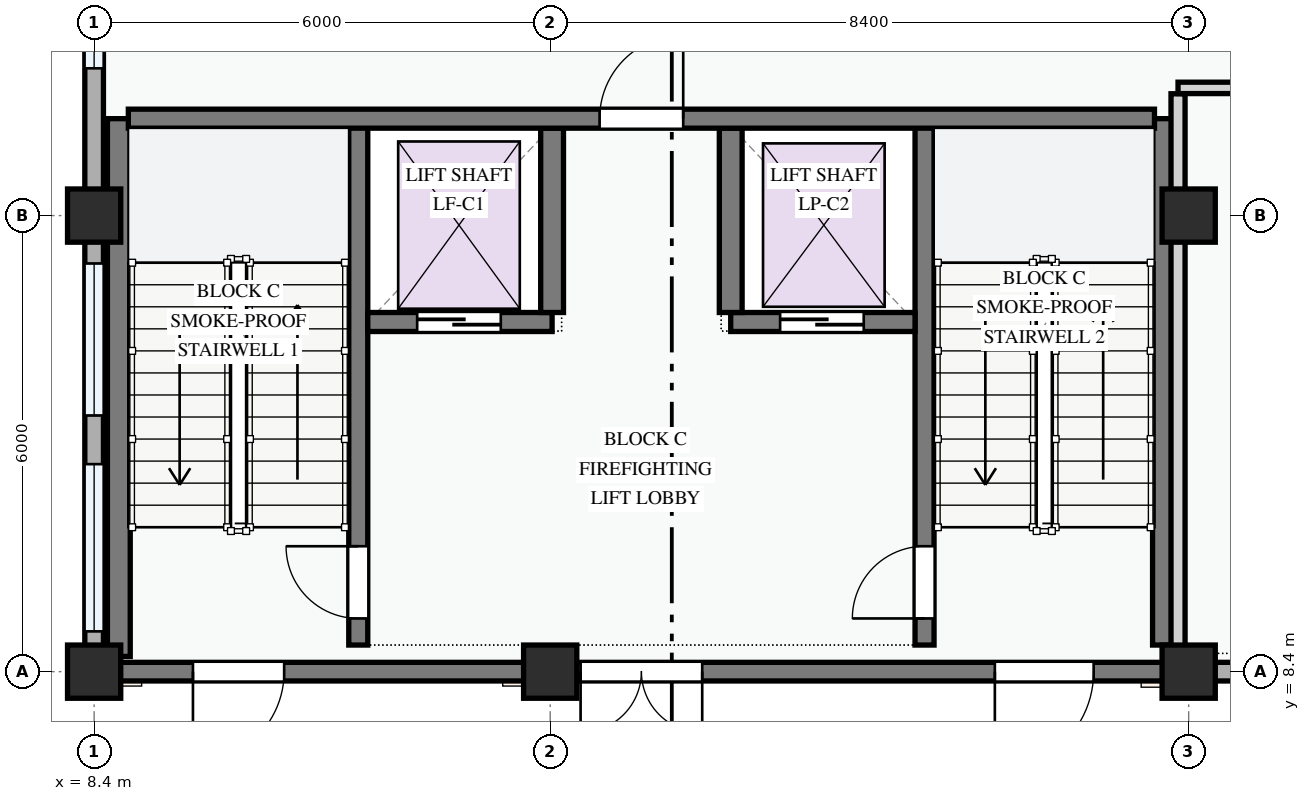
"""IFC4 building model, lengths in metres.
Left out: names, types, materials, properties, quantities, classifications, styles, units other than length and angle.
Written with IfcOpenShell. Run it as: python <this file> out.ifc"""

import sys

from ifc_helpers import new_model, si_unit, direction, frame, frame_2d, origin, origin_2d, place, context, subcontext, project, spatial, rectangle, extrude, element, fill, save


model = new_model("IFC4")
c1 = context("Model", 3, precision=1e-05, world=origin(), true_north=direction((0.0, 1.0)))
c2 = subcontext(c1, "Body", "Model", "MODEL_VIEW")
j1 = project(units=[si_unit("LENGTHUNIT", "METRE"), si_unit("PLANEANGLEUNIT", "RADIAN")], contexts=[c1])
p1 = place(None, origin())
s1 = spatial("IfcSite", under=j1, at=p1, CompositionType="ELEMENT")
p2 = place(p1, origin())
s2 = spatial("IfcBuilding", under=s1, at=p2, CompositionType="ELEMENT")
p3 = place(p2, origin())
s3 = spatial("IfcBuildingStorey", under=s2, at=p3, CompositionType="ELEMENT", Elevation=0.0)
for number, where, z_axis, x_axis in (
    (1, (8.4, 8.4, 0.0), (0.0, 0.0, 1.0), (1.0, 0.0, 0.0)),
    (2, (8.4, 14.4, 0.0), (0.0, 0.0, 1.0), (1.0, 0.0, 0.0)),
    (3, (14.4, 8.4, 0.0), (0.0, 0.0, 1.0), (1.0, 0.0, 0.0)),
    (4, (22.8, 8.4, 0.0), (0.0, 0.0, 1.0), (1.0, 0.0, 0.0)),
    (5, (22.8, 14.4, 0.0), (0.0, 0.0, 1.0), (1.0, 0.0, 0.0)),
):
    element("IfcColumn", number, at=place(p3, frame(where, z_axis=z_axis, x_axis=x_axis)), inside=s3, PredefinedType="COLUMN", context=c2, shape_type="SweptSolid", body=[
        extrude(rectangle(XDim=0.7, YDim=0.7, at=origin_2d()), origin(), (0.0, 0.0, 1.0), 4.5),
    ])
p4 = place(p3, frame((8.4, 22.8, 0.0), z_axis=(0.0, 0.0, 1.0), x_axis=(0.0, -1.0, 0.0)))
e6 = element("IfcWall", 6, at=p4, inside=s3, PredefinedType="STANDARD", context=c2, shape_type="SweptSolid", body=[
    extrude(rectangle(XDim=8.4, YDim=0.245, at=frame_2d((4.2, 0.0))), origin(), (0.0, 0.0, 1.0), 3.485),
])
p5 = place(p4, frame((1.055, 0.0, 0.78)))
e7 = element("IfcOpeningElement", 7, at=p5, cuts=e6, PredefinedType="OPENING", context=c2, shape_type="SweptSolid", body=[
    extrude(rectangle(XDim=2.28, YDim=1.46, at=frame_2d((1.14, 0.73))), frame((0.0, 0.133, 0.0), z_axis=(0.0, -1.0, 0.0), x_axis=(1.0, 0.0, 0.0)), (0.0, 0.0, 1.0), 0.265),
])
p6 = place(p4, frame((4.863, 0.0, 0.78)))
e8 = element("IfcOpeningElement", 8, at=p6, cuts=e6, PredefinedType="OPENING", context=c2, shape_type="SweptSolid", body=[
    extrude(rectangle(XDim=1.6, YDim=1.55, at=frame_2d((0.8, 0.775))), frame((0.0, 0.133, 0.0), z_axis=(0.0, -1.0, 0.0), x_axis=(1.0, 0.0, 0.0)), (0.0, 0.0, 1.0), 0.265),
])
p7 = place(p3, frame((8.4, 14.4, 0.0), z_axis=(0.0, 0.0, 1.0), x_axis=(0.0, -1.0, 0.0)))
e9 = element("IfcWall", 9, at=p7, inside=s3, PredefinedType="STANDARD", context=c2, shape_type="SweptSolid", body=[
    extrude(rectangle(XDim=6.0, YDim=0.245, at=frame_2d((3.0, 0.0))), origin(), (0.0, 0.0, 1.0), 3.585),
])
p8 = place(p7, frame((0.63, 0.0, 0.78)))
e10 = element("IfcOpeningElement", 10, at=p8, cuts=e9, PredefinedType="OPENING", context=c2, shape_type="SweptSolid", body=[
    extrude(rectangle(XDim=2.0, YDim=1.5, at=frame_2d((1.0, 0.75))), frame((0.0, 0.133, 0.0), z_axis=(0.0, -1.0, 0.0), x_axis=(1.0, 0.0, 0.0)), (0.0, 0.0, 1.0), 0.265),
])
p9 = place(p7, frame((3.27, 0.0, 0.78)))
e11 = element("IfcOpeningElement", 11, at=p9, cuts=e9, PredefinedType="OPENING", context=c2, shape_type="SweptSolid", body=[
    extrude(rectangle(XDim=2.2, YDim=1.75, at=frame_2d((1.1, 0.875))), frame((0.0, 0.133, 0.0), z_axis=(0.0, -1.0, 0.0), x_axis=(1.0, 0.0, 0.0)), (0.0, 0.0, 1.0), 0.265),
])
p10 = place(p3, frame((8.4, 8.4, 0.0), z_axis=(0.0, 0.0, 1.0), x_axis=(1.0, 0.0, 0.0)))
e12 = element("IfcWall", 12, at=p10, inside=s3, PredefinedType="STANDARD", context=c2, shape_type="SweptSolid", body=[
    extrude(rectangle(XDim=6.0, YDim=0.245, at=frame_2d((3.0, 0.0))), origin(), (0.0, 0.0, 1.0), 4.2),
])
p11 = place(p10, frame((1.3, 0.0, 0.0)))
e13 = element("IfcOpeningElement", 13, at=p11, cuts=e12, PredefinedType="OPENING", context=c2, shape_type="SweptSolid", body=[
    extrude(rectangle(XDim=1.2, YDim=2.2, at=frame_2d((0.6, 1.1))), frame((0.0, 0.133, 0.0), z_axis=(0.0, -1.0, 0.0), x_axis=(1.0, 0.0, 0.0)), (0.0, 0.0, 1.0), 0.265),
])
p12 = place(p3, frame((14.4, 8.4, 0.0), z_axis=(0.0, 0.0, 1.0), x_axis=(1.0, 0.0, 0.0)))
e14 = element("IfcWall", 14, at=p12, inside=s3, PredefinedType="STANDARD", context=c2, shape_type="SweptSolid", body=[
    extrude(rectangle(XDim=8.4, YDim=0.245, at=frame_2d((4.2, 0.0))), origin(), (0.0, 0.0, 1.0), 4.2),
])
p13 = place(p12, frame((0.4, 0.0, 0.0)))
e15 = element("IfcOpeningElement", 15, at=p13, cuts=e14, PredefinedType="OPENING", context=c2, shape_type="SweptSolid", body=[
    extrude(rectangle(XDim=1.6, YDim=2.35, at=frame_2d((0.8, 1.175))), frame((0.0, 0.133, 0.0), z_axis=(0.0, -1.0, 0.0), x_axis=(1.0, 0.0, 0.0)), (0.0, 0.0, 1.0), 0.265),
])
p14 = place(p12, frame((5.85, 0.0, 0.0)))
e16 = element("IfcOpeningElement", 16, at=p14, cuts=e14, PredefinedType="OPENING", context=c2, shape_type="SweptSolid", body=[
    extrude(rectangle(XDim=1.3, YDim=2.2, at=frame_2d((0.65, 1.1))), frame((0.0, 0.133, 0.0), z_axis=(0.0, -1.0, 0.0), x_axis=(1.0, 0.0, 0.0)), (0.0, 0.0, 1.0), 0.265),
])
p15 = place(p3, frame((22.8, 8.4, 0.0), z_axis=(0.0, 0.0, 1.0), x_axis=(1.0, 0.0, 0.0)))
e17 = element("IfcWall", 17, at=p15, inside=s3, PredefinedType="STANDARD", context=c2, shape_type="SweptSolid", body=[
    extrude(rectangle(XDim=6.0, YDim=0.245, at=frame_2d((3.0, 0.0))), origin(), (0.0, 0.0, 1.0), 3.585),
])
p16 = place(p15, frame((0.58, 0.0, 0.78)))
e18 = element("IfcOpeningElement", 18, at=p16, cuts=e17, PredefinedType="OPENING", context=c2, shape_type="SweptSolid", body=[
    extrude(rectangle(XDim=2.1, YDim=1.55, at=frame_2d((1.05, 0.775))), frame((0.0, 0.133, 0.0), z_axis=(0.0, -1.0, 0.0), x_axis=(1.0, 0.0, 0.0)), (0.0, 0.0, 1.0), 0.265),
])
p17 = place(p15, frame((3.895, 0.0, 0.78)))
e19 = element("IfcOpeningElement", 19, at=p17, cuts=e17, PredefinedType="OPENING", context=c2, shape_type="SweptSolid", body=[
    extrude(rectangle(XDim=0.95, YDim=1.15, at=frame_2d((0.475, 0.575))), frame((0.0, 0.133, 0.0), z_axis=(0.0, -1.0, 0.0), x_axis=(1.0, 0.0, 0.0)), (0.0, 0.0, 1.0), 0.265),
])
p18 = place(p3, frame((11.875, 8.75, 0.0), z_axis=(0.0, 0.0, 1.0), x_axis=(0.0, 1.0, 0.0)))
e20 = element("IfcWall", 20, at=p18, inside=s3, PredefinedType="SHEAR", context=c2, shape_type="SweptSolid", body=[
    extrude(rectangle(XDim=6.925, YDim=0.25, at=frame_2d((3.462, 0.0))), origin(), (0.0, 0.0, 1.0), 4.2),
])
p19 = place(p18, frame((0.35, 0.0, 0.0)))
e21 = element("IfcOpeningElement", 21, at=p19, cuts=e20, PredefinedType="OPENING", context=c2, shape_type="SweptSolid", body=[
    extrude(rectangle(XDim=0.95, YDim=2.1, at=frame_2d((0.475, 1.05))), frame((0.0, 0.135, 0.0), z_axis=(0.0, -1.0, 0.0), x_axis=(1.0, 0.0, 0.0)), (0.0, 0.0, 1.0), 0.27),
])
p20 = place(p3, frame((8.725, 8.6, 0.0), z_axis=(0.0, 0.0, 1.0), x_axis=(0.0, 1.0, 0.0)))
e22 = element("IfcWall", 22, at=p20, inside=s3, PredefinedType="SHEAR", context=c2, shape_type="SweptSolid", body=[
    extrude(rectangle(XDim=7.075, YDim=0.3, at=frame_2d((3.538, 0.0))), origin(), (0.0, 0.0, 1.0), 4.2),
])
p21 = place(p3, frame((22.475, 8.75, 0.0), z_axis=(0.0, 0.0, 1.0), x_axis=(0.0, 1.0, 0.0)))
e23 = element("IfcWall", 23, at=p21, inside=s3, PredefinedType="SHEAR", context=c2, shape_type="SweptSolid", body=[
    extrude(rectangle(XDim=6.925, YDim=0.3, at=frame_2d((3.462, 0.0))), origin(), (0.0, 0.0, 1.0), 4.2),
])
p22 = place(p3, frame((19.325, 8.75, 0.0), z_axis=(0.0, 0.0, 1.0), x_axis=(0.0, 1.0, 0.0)))
e24 = element("IfcWall", 24, at=p22, inside=s3, PredefinedType="SHEAR", context=c2, shape_type="SweptSolid", body=[
    extrude(rectangle(XDim=6.925, YDim=0.25, at=frame_2d((3.462, 0.0))), origin(), (0.0, 0.0, 1.0), 4.2),
])
p23 = place(p22, frame((0.35, 0.0, 0.0)))
e25 = element("IfcOpeningElement", 25, at=p23, cuts=e24, PredefinedType="OPENING", context=c2, shape_type="SweptSolid", body=[
    extrude(rectangle(XDim=0.95, YDim=2.1, at=frame_2d((0.475, 1.05))), frame((0.0, 0.135, 0.0), z_axis=(0.0, -1.0, 0.0), x_axis=(1.0, 0.0, 0.0)), (0.0, 0.0, 1.0), 0.27),
])
p24 = place(p3, frame((12.0, 13.0, 0.0), z_axis=(0.0, 0.0, 1.0), x_axis=(1.0, 0.0, 0.0)))
e26 = element("IfcWall", 26, at=p24, inside=s3, PredefinedType="SHEAR", context=c2, shape_type="SweptSolid", body=[
    extrude(rectangle(XDim=2.425, YDim=0.25, at=frame_2d((1.212, 0.0))), origin(), (0.0, 0.0, 1.0), 4.2),
])
p25 = place(p24, frame((0.65, 0.0, 0.0)))
e27 = element("IfcOpeningElement", 27, at=p25, cuts=e26, PredefinedType="OPENING", context=c2, shape_type="SweptSolid", body=[
    extrude(rectangle(XDim=1.1, YDim=2.15, at=frame_2d((0.55, 1.075))), frame((0.0, 0.135, 0.0), z_axis=(0.0, -1.0, 0.0), x_axis=(1.0, 0.0, 0.0)), (0.0, 0.0, 1.0), 0.27),
])
p26 = place(p3, frame((16.775, 13.0, 0.0), z_axis=(0.0, 0.0, 1.0), x_axis=(1.0, 0.0, 0.0)))
e28 = element("IfcWall", 28, at=p26, inside=s3, PredefinedType="SHEAR", context=c2, shape_type="SweptSolid", body=[
    extrude(rectangle(XDim=2.425, YDim=0.25, at=frame_2d((1.212, 0.0))), origin(), (0.0, 0.0, 1.0), 4.2),
])
p27 = place(p26, frame((0.65, 0.0, 0.0)))
e29 = element("IfcOpeningElement", 29, at=p27, cuts=e28, PredefinedType="OPENING", context=c2, shape_type="SweptSolid", body=[
    extrude(rectangle(XDim=1.1, YDim=2.15, at=frame_2d((0.55, 1.075))), frame((0.0, 0.135, 0.0), z_axis=(0.0, -1.0, 0.0), x_axis=(1.0, 0.0, 0.0)), (0.0, 0.0, 1.0), 0.27),
])
for number, where, z_axis, x_axis in (
    (30, (14.425, 13.125, 0.0), (0.0, 0.0, 1.0), (0.0, 1.0, 0.0)),
    (31, (16.775, 13.125, 0.0), (0.0, 0.0, 1.0), (0.0, 1.0, 0.0)),
):
    element("IfcWall", number, at=place(p3, frame(where, z_axis=z_axis, x_axis=x_axis)), inside=s3, PredefinedType="SHEAR", context=c2, shape_type="SweptSolid", body=[
        extrude(rectangle(XDim=2.425, YDim=0.3, at=frame_2d((1.212, 0.0))), origin(), (0.0, 0.0, 1.0), 4.2),
    ])
p28 = place(p3, frame((8.85, 15.675, 0.0), z_axis=(0.0, 0.0, 1.0), x_axis=(1.0, 0.0, 0.0)))
e32 = element("IfcWall", 32, at=p28, inside=s3, PredefinedType="SHEAR", context=c2, shape_type="SweptSolid", body=[
    extrude(rectangle(XDim=13.5, YDim=0.25, at=frame_2d((6.75, 0.0))), origin(), (0.0, 0.0, 1.0), 4.2),
])
p29 = place(p28, frame((6.2, 0.0, 0.0)))
e33 = element("IfcOpeningElement", 33, at=p29, cuts=e32, PredefinedType="OPENING", context=c2, shape_type="SweptSolid", body=[
    extrude(rectangle(XDim=1.1, YDim=2.15, at=frame_2d((0.55, 1.075))), frame((0.0, 0.135, 0.0), z_axis=(0.0, -1.0, 0.0), x_axis=(1.0, 0.0, 0.0)), (0.0, 0.0, 1.0), 0.27),
])
p30 = place(p3, frame((22.66, 8.524, 0.0), z_axis=(0.0, 0.0, 1.0), x_axis=(0.0, 1.0, 0.0)))
e34 = element("IfcWall", 34, at=p30, inside=s3, PredefinedType="PARTITIONING", context=c2, shape_type="SweptSolid", body=[
    extrude(rectangle(XDim=7.479, YDim=0.185, at=frame_2d((3.739, 0.0))), origin(), (0.0, 0.0, 1.0), 3.485),
])
p31 = place(p3, frame((22.66, 16.08, 0.0), z_axis=(0.0, 0.0, 1.0), x_axis=(1.0, 0.0, 0.0)))
e35 = element("IfcWall", 35, at=p31, inside=s3, PredefinedType="PARTITIONING", context=c2, shape_type="SweptSolid", body=[
    extrude(rectangle(XDim=34.816, YDim=0.15, at=frame_2d((17.408, 0.0))), origin(), (0.0, 0.0, 1.0), 4.2),
])
p32 = place(p31, frame((9.996, 0.0, 0.0)))
e36 = element("IfcOpeningElement", 36, at=p32, cuts=e35, PredefinedType="OPENING", context=c2, shape_type="SweptSolid", body=[
    extrude(rectangle(XDim=0.95, YDim=2.1, at=frame_2d((0.475, 1.05))), frame((0.0, 0.085, 0.0), z_axis=(0.0, -1.0, 0.0), x_axis=(1.0, 0.0, 0.0)), (0.0, 0.0, 1.0), 0.17),
])
p33 = place(p31, frame((16.965, 0.0, 0.0)))
e37 = element("IfcOpeningElement", 37, at=p33, cuts=e35, PredefinedType="OPENING", context=c2, shape_type="SweptSolid", body=[
    extrude(rectangle(XDim=0.95, YDim=2.1, at=frame_2d((0.475, 1.05))), frame((0.0, 0.085, 0.0), z_axis=(0.0, -1.0, 0.0), x_axis=(1.0, 0.0, 0.0)), (0.0, 0.0, 1.0), 0.17),
])
p34 = place(p31, frame((24.249, 0.0, 0.0)))
e38 = element("IfcOpeningElement", 38, at=p34, cuts=e35, PredefinedType="OPENING", context=c2, shape_type="SweptSolid", body=[
    extrude(rectangle(XDim=0.95, YDim=2.1, at=frame_2d((0.475, 1.05))), frame((0.0, 0.085, 0.0), z_axis=(0.0, -1.0, 0.0), x_axis=(1.0, 0.0, 0.0)), (0.0, 0.0, 1.0), 0.17),
])
p35 = place(p6, origin())
e39 = element("IfcWindow", 39, at=p35, inside=s3, PartitioningType="DOUBLE_PANEL_VERTICAL", PredefinedType="WINDOW", context=c2, shape_type="SweptSolid", body=[
    extrude(rectangle(XDim=1.6, YDim=1.55, at=frame_2d((0.8, 0.775))), frame((0.0, 0.03, 0.0), z_axis=(0.0, -1.0, 0.0), x_axis=(1.0, 0.0, 0.0)), (0.0, 0.0, 1.0), 0.06),
])
fill(e8, e39)
p36 = place(p8, origin())
e40 = element("IfcWindow", 40, at=p36, inside=s3, PartitioningType="DOUBLE_PANEL_VERTICAL", PredefinedType="WINDOW", context=c2, shape_type="SweptSolid", body=[
    extrude(rectangle(XDim=2.0, YDim=1.5, at=frame_2d((1.0, 0.75))), frame((0.0, 0.03, 0.0), z_axis=(0.0, -1.0, 0.0), x_axis=(1.0, 0.0, 0.0)), (0.0, 0.0, 1.0), 0.06),
])
fill(e10, e40)
p37 = place(p9, origin())
e41 = element("IfcWindow", 41, at=p37, inside=s3, PartitioningType="DOUBLE_PANEL_VERTICAL", PredefinedType="WINDOW", context=c2, shape_type="SweptSolid", body=[
    extrude(rectangle(XDim=2.2, YDim=1.75, at=frame_2d((1.1, 0.875))), frame((0.0, 0.03, 0.0), z_axis=(0.0, -1.0, 0.0), x_axis=(1.0, 0.0, 0.0)), (0.0, 0.0, 1.0), 0.06),
])
fill(e11, e41)
p38 = place(p11, frame((1.2, 0.0, 0.0), z_axis=(0.0, 0.0, 1.0), x_axis=(-1.0, 0.0, 0.0)))
e42 = element("IfcDoor", 42, at=p38, inside=s3, OperationType="SINGLE_SWING_RIGHT", PredefinedType="DOOR", context=c2, shape_type="SweptSolid", body=[
    extrude(rectangle(XDim=1.2, YDim=2.2, at=frame_2d((0.6, 1.1))), frame((0.0, 0.025, 0.0), z_axis=(0.0, -1.0, 0.0), x_axis=(1.0, 0.0, 0.0)), (0.0, 0.0, 1.0), 0.05),
])
fill(e13, e42)
p39 = place(p13, frame((1.6, 0.0, 0.0), z_axis=(0.0, 0.0, 1.0), x_axis=(-1.0, 0.0, 0.0)))
e43 = element("IfcDoor", 43, at=p39, inside=s3, OperationType="DOUBLE_DOOR_SINGLE_SWING", PredefinedType="DOOR", context=c2, shape_type="SweptSolid", body=[
    extrude(rectangle(XDim=1.6, YDim=2.35, at=frame_2d((0.8, 1.175))), frame((0.0, 0.025, 0.0), z_axis=(0.0, -1.0, 0.0), x_axis=(1.0, 0.0, 0.0)), (0.0, 0.0, 1.0), 0.05),
])
fill(e15, e43)
p40 = place(p14, frame((1.3, 0.0, 0.0), z_axis=(0.0, 0.0, 1.0), x_axis=(-1.0, 0.0, 0.0)))
e44 = element("IfcDoor", 44, at=p40, inside=s3, OperationType="SINGLE_SWING_RIGHT", PredefinedType="DOOR", context=c2, shape_type="SweptSolid", body=[
    extrude(rectangle(XDim=1.3, YDim=2.2, at=frame_2d((0.65, 1.1))), frame((0.0, 0.025, 0.0), z_axis=(0.0, -1.0, 0.0), x_axis=(1.0, 0.0, 0.0)), (0.0, 0.0, 1.0), 0.05),
])
fill(e16, e44)
p41 = place(p19, origin())
e45 = element("IfcDoor", 45, at=p41, inside=s3, OperationType="SINGLE_SWING_RIGHT", PredefinedType="DOOR", context=c2, shape_type="SweptSolid", body=[
    extrude(rectangle(XDim=0.95, YDim=2.1, at=frame_2d((0.475, 1.05))), frame((0.0, 0.025, 0.0), z_axis=(0.0, -1.0, 0.0), x_axis=(1.0, 0.0, 0.0)), (0.0, 0.0, 1.0), 0.05),
])
fill(e21, e45)
p42 = place(p23, origin())
e46 = element("IfcDoor", 46, at=p42, inside=s3, OperationType="SINGLE_SWING_LEFT", PredefinedType="DOOR", context=c2, shape_type="SweptSolid", body=[
    extrude(rectangle(XDim=0.95, YDim=2.1, at=frame_2d((0.475, 1.05))), frame((0.0, 0.025, 0.0), z_axis=(0.0, -1.0, 0.0), x_axis=(1.0, 0.0, 0.0)), (0.0, 0.0, 1.0), 0.05),
])
fill(e25, e46)
p43 = place(p25, origin())
e47 = element("IfcDoor", 47, at=p43, inside=s3, OperationType="SLIDING_TO_LEFT", PredefinedType="DOOR", context=c2, shape_type="SweptSolid", body=[
    extrude(rectangle(XDim=1.1, YDim=2.15, at=frame_2d((0.55, 1.075))), frame((0.0, 0.025, 0.0), z_axis=(0.0, -1.0, 0.0), x_axis=(1.0, 0.0, 0.0)), (0.0, 0.0, 1.0), 0.05),
])
fill(e27, e47)
p44 = place(p27, origin())
e48 = element("IfcDoor", 48, at=p44, inside=s3, OperationType="SLIDING_TO_LEFT", PredefinedType="DOOR", context=c2, shape_type="SweptSolid", body=[
    extrude(rectangle(XDim=1.1, YDim=2.15, at=frame_2d((0.55, 1.075))), frame((0.0, 0.025, 0.0), z_axis=(0.0, -1.0, 0.0), x_axis=(1.0, 0.0, 0.0)), (0.0, 0.0, 1.0), 0.05),
])
fill(e29, e48)
p45 = place(p29, origin())
e49 = element("IfcDoor", 49, at=p45, inside=s3, OperationType="SINGLE_SWING_RIGHT", PredefinedType="DOOR", context=c2, shape_type="SweptSolid", body=[
    extrude(rectangle(XDim=1.1, YDim=2.15, at=frame_2d((0.55, 1.075))), frame((0.0, 0.025, 0.0), z_axis=(0.0, -1.0, 0.0), x_axis=(1.0, 0.0, 0.0)), (0.0, 0.0, 1.0), 0.05),
])
fill(e33, e49)
save(model, sys.argv[1])
